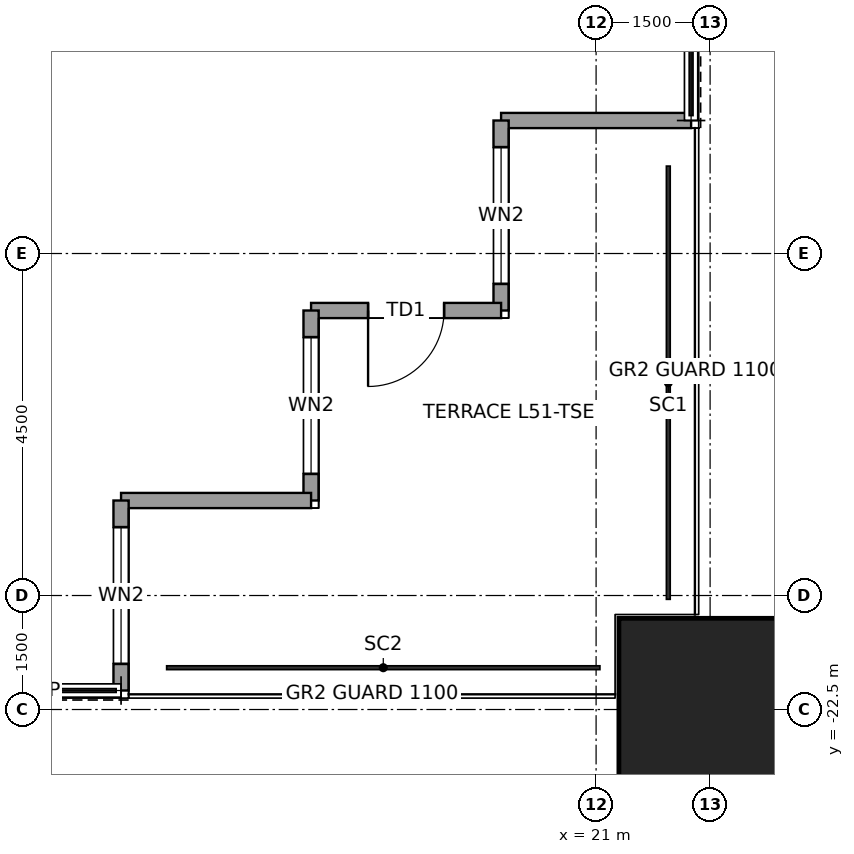
"""IFC4 building model, lengths in metres.
Left out: names, types, materials, properties, quantities, classifications, styles, units other than length and angle.
Written with IfcOpenShell. Run it as: python <this file> out.ifc"""

import sys

from ifc_helpers import new_model, si_unit, direction, frame, frame_2d, origin, origin_2d, place, context, subcontext, project, spatial, rectangle, hollow_rectangle, extrude, element, fill, save


model = new_model("IFC4")
c1 = context("Model", 3, precision=1e-05, world=origin(), true_north=direction((0.0, 1.0)))
c2 = subcontext(c1, "Body", "Model", "MODEL_VIEW")
j1 = project(units=[si_unit("LENGTHUNIT", "METRE"), si_unit("PLANEANGLEUNIT", "RADIAN")], contexts=[c1])
p1 = place(None, origin())
s1 = spatial("IfcSite", under=j1, at=p1, CompositionType="ELEMENT")
p2 = place(p1, origin())
s2 = spatial("IfcBuilding", under=s1, at=p2, CompositionType="ELEMENT")
p3 = place(p2, frame((0.0, 0.0, 237.9)))
s3 = spatial("IfcBuildingStorey", under=s2, at=p3, CompositionType="ELEMENT", Elevation=237.9)
p4 = place(p3, frame((22.5, -22.5, 0.0), z_axis=(0.0, 0.0, 1.0), x_axis=(1.0, 0.0, 0.0)))
e1 = element("IfcColumn", 1, at=p4, inside=s3, PredefinedType="COLUMN", context=c2, shape_type="SweptSolid", body=[
    extrude(hollow_rectangle(XDim=2.4, YDim=2.4, WallThickness=0.12, at=origin_2d()), origin(), (0.0, 0.0, 1.0), 4.0),
])
p5 = place(p3, frame((22.25, -14.75, 0.0), z_axis=(0.0, 0.0, 1.0), x_axis=(-1.0, 0.0, 0.0)))
e2 = element("IfcWall", 2, at=p5, inside=s3, PredefinedType="SOLIDWALL", context=c2, shape_type="SweptSolid", body=[
    extrude(rectangle(XDim=2.5, YDim=0.2, at=frame_2d((1.25, 0.0))), origin(), (0.0, 0.0, 1.0), 3.85),
])
p6 = place(p3, frame((19.75, -14.75, 0.0), z_axis=(0.0, 0.0, 1.0), x_axis=(0.0, -1.0, 0.0)))
e3 = element("IfcWall", 3, at=p6, inside=s3, PredefinedType="SOLIDWALL", context=c2, shape_type="SweptSolid", body=[
    extrude(rectangle(XDim=2.5, YDim=0.2, at=frame_2d((1.25, 0.0))), origin(), (0.0, 0.0, 1.0), 3.85),
])
p7 = place(p6, frame((0.35, 0.0, 0.3)))
e4 = element("IfcOpeningElement", 4, at=p7, cuts=e3, PredefinedType="OPENING", context=c2, shape_type="SweptSolid", body=[
    extrude(rectangle(XDim=1.8, YDim=2.4, at=frame_2d((0.9, 1.2))), frame((0.0, 0.11, 0.0), z_axis=(0.0, -1.0, 0.0), x_axis=(1.0, 0.0, 0.0)), (0.0, 0.0, 1.0), 0.22),
])
p8 = place(p3, frame((19.75, -17.25, 0.0), z_axis=(0.0, 0.0, 1.0), x_axis=(-1.0, 0.0, 0.0)))
e5 = element("IfcWall", 5, at=p8, inside=s3, PredefinedType="SOLIDWALL", context=c2, shape_type="SweptSolid", body=[
    extrude(rectangle(XDim=2.5, YDim=0.2, at=frame_2d((1.25, 0.0))), origin(), (0.0, 0.0, 1.0), 3.85),
])
p9 = place(p8, frame((0.75, 0.0, 0.0)))
e6 = element("IfcOpeningElement", 6, at=p9, cuts=e5, PredefinedType="OPENING", context=c2, shape_type="SweptSolid", body=[
    extrude(rectangle(XDim=1.0, YDim=2.4, at=frame_2d((0.5, 1.2))), frame((0.0, 0.11, 0.0), z_axis=(0.0, -1.0, 0.0), x_axis=(1.0, 0.0, 0.0)), (0.0, 0.0, 1.0), 0.22),
])
p10 = place(p3, frame((17.25, -17.25, 0.0), z_axis=(0.0, 0.0, 1.0), x_axis=(0.0, -1.0, 0.0)))
e7 = element("IfcWall", 7, at=p10, inside=s3, PredefinedType="SOLIDWALL", context=c2, shape_type="SweptSolid", body=[
    extrude(rectangle(XDim=2.5, YDim=0.2, at=frame_2d((1.25, 0.0))), origin(), (0.0, 0.0, 1.0), 3.85),
])
p11 = place(p10, frame((0.35, 0.0, 0.3)))
e8 = element("IfcOpeningElement", 8, at=p11, cuts=e7, PredefinedType="OPENING", context=c2, shape_type="SweptSolid", body=[
    extrude(rectangle(XDim=1.8, YDim=2.4, at=frame_2d((0.9, 1.2))), frame((0.0, 0.11, 0.0), z_axis=(0.0, -1.0, 0.0), x_axis=(1.0, 0.0, 0.0)), (0.0, 0.0, 1.0), 0.22),
])
p12 = place(p3, frame((17.25, -19.75, 0.0), z_axis=(0.0, 0.0, 1.0), x_axis=(-1.0, 0.0, 0.0)))
e9 = element("IfcWall", 9, at=p12, inside=s3, PredefinedType="SOLIDWALL", context=c2, shape_type="SweptSolid", body=[
    extrude(rectangle(XDim=2.5, YDim=0.2, at=frame_2d((1.25, 0.0))), origin(), (0.0, 0.0, 1.0), 3.85),
])
p13 = place(p3, frame((14.75, -19.75, 0.0), z_axis=(0.0, 0.0, 1.0), x_axis=(0.0, -1.0, 0.0)))
e10 = element("IfcWall", 10, at=p13, inside=s3, PredefinedType="SOLIDWALL", context=c2, shape_type="SweptSolid", body=[
    extrude(rectangle(XDim=2.5, YDim=0.2, at=frame_2d((1.25, 0.0))), origin(), (0.0, 0.0, 1.0), 3.85),
])
p14 = place(p13, frame((0.35, 0.0, 0.3)))
e11 = element("IfcOpeningElement", 11, at=p14, cuts=e10, PredefinedType="OPENING", context=c2, shape_type="SweptSolid", body=[
    extrude(rectangle(XDim=1.8, YDim=2.4, at=frame_2d((0.9, 1.2))), frame((0.0, 0.11, 0.0), z_axis=(0.0, -1.0, 0.0), x_axis=(1.0, 0.0, 0.0)), (0.0, 0.0, 1.0), 0.22),
])
p15 = place(p7, origin())
e12 = element("IfcWindow", 12, at=p15, inside=s3, PartitioningType="SINGLE_PANEL", PredefinedType="WINDOW", context=c2, shape_type="SweptSolid", body=[
    extrude(rectangle(XDim=1.8, YDim=2.4, at=frame_2d((0.9, 1.2))), frame((0.0, 0.03, 0.0), z_axis=(0.0, -1.0, 0.0), x_axis=(1.0, 0.0, 0.0)), (0.0, 0.0, 1.0), 0.06),
])
fill(e4, e12)
p16 = place(p9, origin())
e13 = element("IfcDoor", 13, at=p16, inside=s3, OperationType="SINGLE_SWING_RIGHT", PredefinedType="DOOR", context=c2, shape_type="SweptSolid", body=[
    extrude(rectangle(XDim=1.0, YDim=2.4, at=frame_2d((0.5, 1.2))), frame((0.0, 0.025, 0.0), z_axis=(0.0, -1.0, 0.0), x_axis=(1.0, 0.0, 0.0)), (0.0, 0.0, 1.0), 0.05),
])
fill(e6, e13)
p17 = place(p11, origin())
e14 = element("IfcWindow", 14, at=p17, inside=s3, PartitioningType="SINGLE_PANEL", PredefinedType="WINDOW", context=c2, shape_type="SweptSolid", body=[
    extrude(rectangle(XDim=1.8, YDim=2.4, at=frame_2d((0.9, 1.2))), frame((0.0, 0.03, 0.0), z_axis=(0.0, -1.0, 0.0), x_axis=(1.0, 0.0, 0.0)), (0.0, 0.0, 1.0), 0.06),
])
fill(e8, e14)
p18 = place(p14, origin())
e15 = element("IfcWindow", 15, at=p18, inside=s3, PartitioningType="SINGLE_PANEL", PredefinedType="WINDOW", context=c2, shape_type="SweptSolid", body=[
    extrude(rectangle(XDim=1.8, YDim=2.4, at=frame_2d((0.9, 1.2))), frame((0.0, 0.03, 0.0), z_axis=(0.0, -1.0, 0.0), x_axis=(1.0, 0.0, 0.0)), (0.0, 0.0, 1.0), 0.06),
])
fill(e11, e15)
save(model, sys.argv[1])
